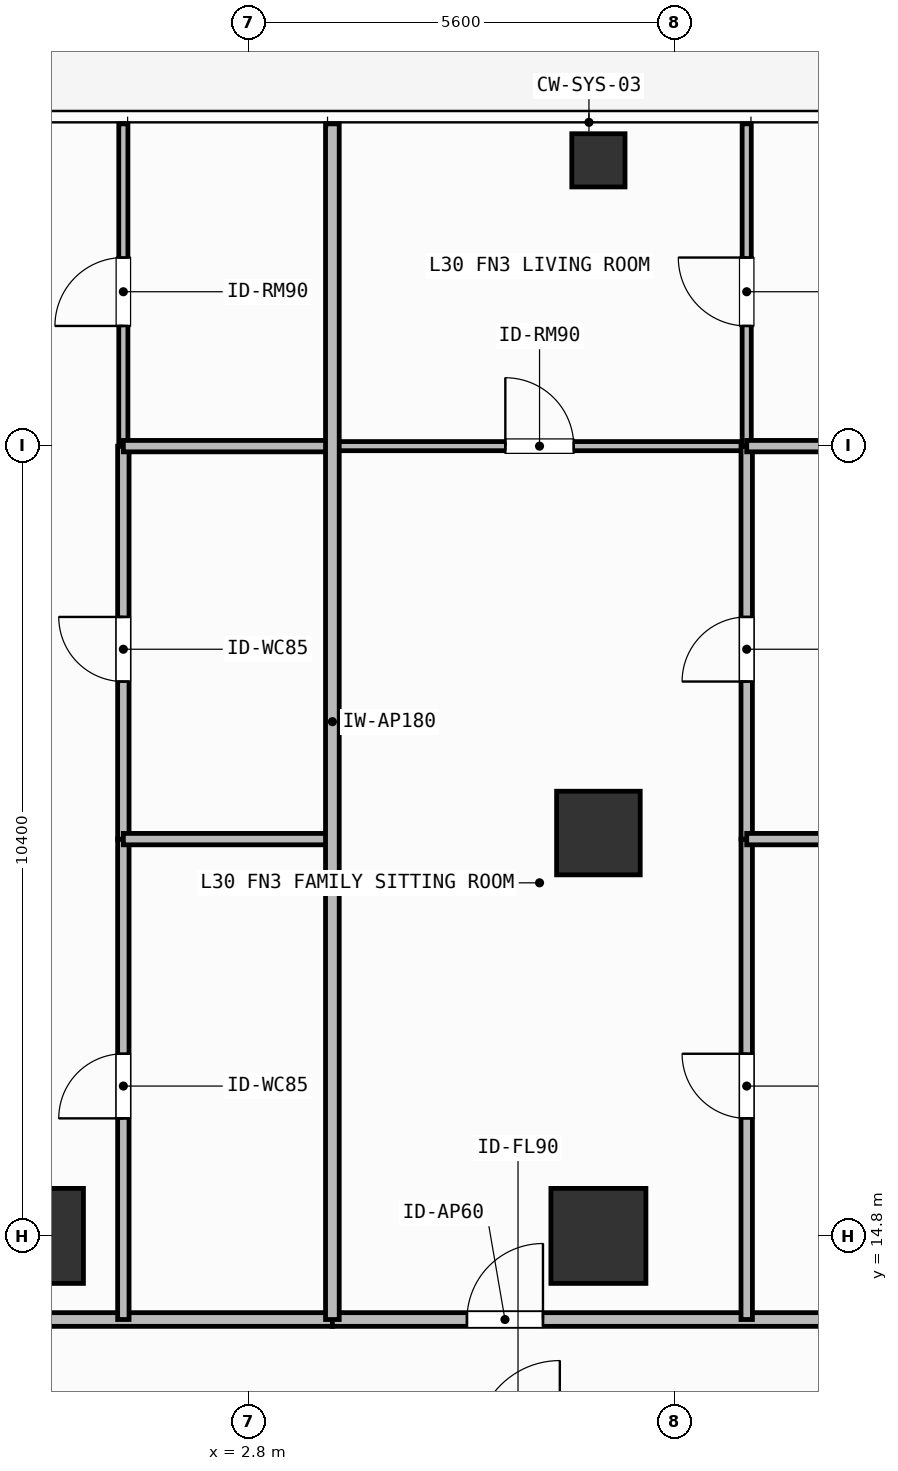
"""IFC4 building model, lengths in metres.
Left out: names, types, materials, properties, quantities, classifications, styles, units other than length and angle.
Written with IfcOpenShell. Run it as: python <this file> out.ifc"""

import sys

from ifc_helpers import new_model, si_unit, direction, frame, frame_2d, origin, origin_2d, place, context, subcontext, project, spatial, rectangle, hollow_rectangle, extrude, element, fill, save


model = new_model("IFC4")
c1 = context("Model", 3, precision=1e-05, world=origin(), true_north=direction((0.0, 1.0)))
c2 = subcontext(c1, "Body", "Model", "MODEL_VIEW")
j1 = project(units=[si_unit("LENGTHUNIT", "METRE"), si_unit("PLANEANGLEUNIT", "RADIAN")], contexts=[c1])
p1 = place(None, origin())
s1 = spatial("IfcSite", under=j1, at=p1, CompositionType="ELEMENT")
p2 = place(p1, origin())
s2 = spatial("IfcBuilding", under=s1, at=p2, CompositionType="ELEMENT")
p3 = place(p2, frame((0.0, 0.0, 121.2)))
s3 = spatial("IfcBuildingStorey", under=s2, at=p3, CompositionType="ELEMENT", Elevation=121.2)
for number, where, z_axis, x_axis in (
    (1, (0.0, 14.8, 0.0), (0.0, 0.0, 1.0), (1.0, 0.0, 0.0)),
    (2, (7.4, 14.8, 0.0), (0.0, 0.0, 1.0), (1.0, 0.0, 0.0)),
):
    element("IfcColumn", number, at=place(p3, frame(where, z_axis=z_axis, x_axis=x_axis)), inside=s3, PredefinedType="COLUMN", context=c2, shape_type="SweptSolid", body=[
        extrude(rectangle(XDim=1.25, YDim=1.25, at=origin_2d()), origin(), (0.0, 0.0, 1.0), 3.9),
    ])
p4 = place(p3, frame((7.4, 20.1, 0.0), z_axis=(0.0, 0.0, 1.0), x_axis=(1.0, 0.0, 0.0)))
e3 = element("IfcColumn", 3, at=p4, inside=s3, PredefinedType="COLUMN", context=c2, shape_type="SweptSolid", body=[
    extrude(rectangle(XDim=1.1, YDim=1.1, at=origin_2d()), origin(), (0.0, 0.0, 1.0), 3.9),
])
p5 = place(p3, frame((7.4, 28.95, 0.0), z_axis=(0.0, 0.0, 1.0), x_axis=(1.0, 0.0, 0.0)))
e4 = element("IfcColumn", 4, at=p5, inside=s3, PredefinedType="COLUMN", context=c2, shape_type="SweptSolid", body=[
    extrude(hollow_rectangle(XDim=0.7, YDim=0.7, WallThickness=0.032, at=origin_2d()), origin(), (0.0, 0.0, 1.0), 3.9),
])
p6 = place(p3, frame((-3.379, 13.7, 0.0), z_axis=(0.0, 0.0, 1.0), x_axis=(1.0, 0.0, 0.0)))
e5 = element("IfcWall", 5, at=p6, inside=s3, PredefinedType="PARTITIONING", context=c2, shape_type="SweptSolid", body=[
    extrude(rectangle(XDim=7.279, YDim=0.18, at=frame_2d((3.639, 0.0))), origin(), (0.0, 0.0, 1.0), 3.68),
])
p7 = place(p6, frame((1.562, 0.0, 0.0)))
e6 = element("IfcOpeningElement", 6, at=p7, cuts=e5, PredefinedType="OPENING", context=c2, shape_type="SweptSolid", body=[
    extrude(rectangle(XDim=1.0, YDim=2.2, at=frame_2d((0.5, 1.1))), frame((0.0, 0.1, 0.0), z_axis=(0.0, -1.0, 0.0), x_axis=(1.0, 0.0, 0.0)), (0.0, 0.0, 1.0), 0.2),
])
p8 = place(p3, frame((1.15, 13.7, 0.0), z_axis=(0.0, 0.0, 1.0), x_axis=(0.0, 1.0, 0.0)))
e7 = element("IfcWall", 7, at=p8, inside=s3, PredefinedType="PARTITIONING", context=c2, shape_type="SweptSolid", body=[
    extrude(rectangle(XDim=6.32, YDim=0.15, at=frame_2d((3.16, 0.0))), origin(), (0.0, 0.0, 1.0), 3.68),
])
p9 = place(p8, frame((2.646, 0.0, 0.0)))
e8 = element("IfcOpeningElement", 8, at=p9, cuts=e7, PredefinedType="OPENING", context=c2, shape_type="SweptSolid", body=[
    extrude(rectangle(XDim=0.85, YDim=2.1, at=frame_2d((0.425, 1.05))), frame((0.0, 0.085, 0.0), z_axis=(0.0, -1.0, 0.0), x_axis=(1.0, 0.0, 0.0)), (0.0, 0.0, 1.0), 0.17),
])
p10 = place(p3, frame((1.15, 20.02, 0.0), z_axis=(0.0, 0.0, 1.0), x_axis=(0.0, 1.0, 0.0)))
e9 = element("IfcWall", 9, at=p10, inside=s3, PredefinedType="PARTITIONING", context=c2, shape_type="SweptSolid", body=[
    extrude(rectangle(XDim=5.17, YDim=0.15, at=frame_2d((2.585, 0.0))), origin(), (0.0, 0.0, 1.0), 3.68),
])
p11 = place(p10, frame((2.073, 0.0, 0.0)))
e10 = element("IfcOpeningElement", 10, at=p11, cuts=e9, PredefinedType="OPENING", context=c2, shape_type="SweptSolid", body=[
    extrude(rectangle(XDim=0.85, YDim=2.1, at=frame_2d((0.425, 1.05))), frame((0.0, 0.085, 0.0), z_axis=(0.0, -1.0, 0.0), x_axis=(1.0, 0.0, 0.0)), (0.0, 0.0, 1.0), 0.17),
])
p12 = place(p3, frame((1.15, 25.19, 0.0), z_axis=(0.0, 0.0, 1.0), x_axis=(0.0, 1.0, 0.0)))
e11 = element("IfcWall", 11, at=p12, inside=s3, PredefinedType="PARTITIONING", context=c2, shape_type="SweptSolid", body=[
    extrude(rectangle(XDim=4.24, YDim=0.12, at=frame_2d((2.12, 0.0))), origin(), (0.0, 0.0, 1.0), 3.68),
])
p13 = place(p12, frame((1.581, 0.0, 0.0)))
e12 = element("IfcOpeningElement", 12, at=p13, cuts=e11, PredefinedType="OPENING", context=c2, shape_type="SweptSolid", body=[
    extrude(rectangle(XDim=0.9, YDim=2.1, at=frame_2d((0.45, 1.05))), frame((0.0, 0.07, 0.0), z_axis=(0.0, -1.0, 0.0), x_axis=(1.0, 0.0, 0.0)), (0.0, 0.0, 1.0), 0.14),
])
p14 = place(p3, frame((3.9, 13.7, 0.0), z_axis=(0.0, 0.0, 1.0), x_axis=(1.0, 0.0, 0.0)))
e13 = element("IfcWall", 13, at=p14, inside=s3, PredefinedType="PARTITIONING", context=c2, shape_type="SweptSolid", body=[
    extrude(rectangle(XDim=8.836, YDim=0.18, at=frame_2d((4.418, 0.0))), origin(), (0.0, 0.0, 1.0), 3.68),
])
p15 = place(p14, frame((1.771, 0.0, 0.0)))
e14 = element("IfcOpeningElement", 14, at=p15, cuts=e13, PredefinedType="OPENING", context=c2, shape_type="SweptSolid", body=[
    extrude(rectangle(XDim=1.0, YDim=2.2, at=frame_2d((0.5, 1.1))), frame((0.0, 0.1, 0.0), z_axis=(0.0, -1.0, 0.0), x_axis=(1.0, 0.0, 0.0)), (0.0, 0.0, 1.0), 0.2),
])
p16 = place(p3, frame((3.9, 25.19, 0.0), z_axis=(0.0, 0.0, 1.0), x_axis=(1.0, 0.0, 0.0)))
e15 = element("IfcWall", 15, at=p16, inside=s3, PredefinedType="PARTITIONING", context=c2, shape_type="SweptSolid", body=[
    extrude(rectangle(XDim=5.451, YDim=0.12, at=frame_2d((2.726, 0.0))), origin(), (0.0, 0.0, 1.0), 3.68),
])
p17 = place(p16, frame((2.275, 0.0, 0.0)))
e16 = element("IfcOpeningElement", 16, at=p17, cuts=e15, PredefinedType="OPENING", context=c2, shape_type="SweptSolid", body=[
    extrude(rectangle(XDim=0.9, YDim=2.1, at=frame_2d((0.45, 1.05))), frame((0.0, 0.07, 0.0), z_axis=(0.0, -1.0, 0.0), x_axis=(1.0, 0.0, 0.0)), (0.0, 0.0, 1.0), 0.14),
])
p18 = place(p3, frame((9.351, 13.7, 0.0), z_axis=(0.0, 0.0, 1.0), x_axis=(0.0, 1.0, 0.0)))
e17 = element("IfcWall", 17, at=p18, inside=s3, PredefinedType="PARTITIONING", context=c2, shape_type="SweptSolid", body=[
    extrude(rectangle(XDim=6.32, YDim=0.15, at=frame_2d((3.16, 0.0))), origin(), (0.0, 0.0, 1.0), 3.68),
])
p19 = place(p18, frame((2.646, 0.0, 0.0)))
e18 = element("IfcOpeningElement", 18, at=p19, cuts=e17, PredefinedType="OPENING", context=c2, shape_type="SweptSolid", body=[
    extrude(rectangle(XDim=0.85, YDim=2.1, at=frame_2d((0.425, 1.05))), frame((0.0, 0.085, 0.0), z_axis=(0.0, -1.0, 0.0), x_axis=(1.0, 0.0, 0.0)), (0.0, 0.0, 1.0), 0.17),
])
p20 = place(p3, frame((9.351, 20.02, 0.0), z_axis=(0.0, 0.0, 1.0), x_axis=(0.0, 1.0, 0.0)))
e19 = element("IfcWall", 19, at=p20, inside=s3, PredefinedType="PARTITIONING", context=c2, shape_type="SweptSolid", body=[
    extrude(rectangle(XDim=5.17, YDim=0.15, at=frame_2d((2.585, 0.0))), origin(), (0.0, 0.0, 1.0), 3.68),
])
p21 = place(p20, frame((2.073, 0.0, 0.0)))
e20 = element("IfcOpeningElement", 20, at=p21, cuts=e19, PredefinedType="OPENING", context=c2, shape_type="SweptSolid", body=[
    extrude(rectangle(XDim=0.85, YDim=2.1, at=frame_2d((0.425, 1.05))), frame((0.0, 0.085, 0.0), z_axis=(0.0, -1.0, 0.0), x_axis=(1.0, 0.0, 0.0)), (0.0, 0.0, 1.0), 0.17),
])
p22 = place(p3, frame((9.351, 25.19, 0.0), z_axis=(0.0, 0.0, 1.0), x_axis=(0.0, 1.0, 0.0)))
e21 = element("IfcWall", 21, at=p22, inside=s3, PredefinedType="PARTITIONING", context=c2, shape_type="SweptSolid", body=[
    extrude(rectangle(XDim=4.24, YDim=0.12, at=frame_2d((2.12, 0.0))), origin(), (0.0, 0.0, 1.0), 3.68),
])
p23 = place(p22, frame((1.581, 0.0, 0.0)))
e22 = element("IfcOpeningElement", 22, at=p23, cuts=e21, PredefinedType="OPENING", context=c2, shape_type="SweptSolid", body=[
    extrude(rectangle(XDim=0.9, YDim=2.1, at=frame_2d((0.45, 1.05))), frame((0.0, 0.07, 0.0), z_axis=(0.0, -1.0, 0.0), x_axis=(1.0, 0.0, 0.0)), (0.0, 0.0, 1.0), 0.14),
])
p24 = place(p3, frame((1.15, 20.02, 0.0), z_axis=(0.0, 0.0, 1.0), x_axis=(1.0, 0.0, 0.0)))
e23 = element("IfcWall", 23, at=p24, inside=s3, PredefinedType="PARTITIONING", context=c2, shape_type="SweptSolid", body=[
    extrude(rectangle(XDim=2.75, YDim=0.15, at=frame_2d((1.375, 0.0))), origin(), (0.0, 0.0, 1.0), 3.082),
])
p25 = place(p3, frame((1.15, 25.19, 0.0), z_axis=(0.0, 0.0, 1.0), x_axis=(1.0, 0.0, 0.0)))
e24 = element("IfcWall", 24, at=p25, inside=s3, PredefinedType="PARTITIONING", context=c2, shape_type="SweptSolid", body=[
    extrude(rectangle(XDim=2.75, YDim=0.15, at=frame_2d((1.375, 0.0))), origin(), (0.0, 0.0, 1.0), 3.68),
])
p26 = place(p3, frame((9.351, 20.02, 0.0), z_axis=(0.0, 0.0, 1.0), x_axis=(1.0, 0.0, 0.0)))
e25 = element("IfcWall", 25, at=p26, inside=s3, PredefinedType="PARTITIONING", context=c2, shape_type="SweptSolid", body=[
    extrude(rectangle(XDim=3.385, YDim=0.15, at=frame_2d((1.692, 0.0))), origin(), (0.0, 0.0, 1.0), 3.082),
])
p27 = place(p3, frame((9.351, 25.19, 0.0), z_axis=(0.0, 0.0, 1.0), x_axis=(1.0, 0.0, 0.0)))
e26 = element("IfcWall", 26, at=p27, inside=s3, PredefinedType="PARTITIONING", context=c2, shape_type="SweptSolid", body=[
    extrude(rectangle(XDim=3.385, YDim=0.15, at=frame_2d((1.692, 0.0))), origin(), (0.0, 0.0, 1.0), 3.68),
])
p28 = place(p3, frame((3.9, 13.7, 0.0), z_axis=(0.0, 0.0, 1.0), x_axis=(0.0, 1.0, 0.0)))
e27 = element("IfcWall", 27, at=p28, inside=s3, PredefinedType="PARTITIONING", context=c2, shape_type="SweptSolid", body=[
    extrude(rectangle(XDim=15.73, YDim=0.18, at=frame_2d((7.865, 0.0))), origin(), (0.0, 0.0, 1.0), 3.68),
])
p29 = place(p9, origin())
e28 = element("IfcDoor", 28, at=p29, inside=s3, OperationType="SINGLE_SWING_LEFT", PredefinedType="DOOR", context=c2, shape_type="SweptSolid", body=[
    extrude(rectangle(XDim=0.85, YDim=2.1, at=frame_2d((0.425, 1.05))), frame((0.0, 0.025, 0.0), z_axis=(0.0, -1.0, 0.0), x_axis=(1.0, 0.0, 0.0)), (0.0, 0.0, 1.0), 0.05),
])
fill(e8, e28)
p30 = place(p11, origin())
e29 = element("IfcDoor", 29, at=p30, inside=s3, OperationType="SINGLE_SWING_RIGHT", PredefinedType="DOOR", context=c2, shape_type="SweptSolid", body=[
    extrude(rectangle(XDim=0.85, YDim=2.1, at=frame_2d((0.425, 1.05))), frame((0.0, 0.025, 0.0), z_axis=(0.0, -1.0, 0.0), x_axis=(1.0, 0.0, 0.0)), (0.0, 0.0, 1.0), 0.05),
])
fill(e10, e29)
p31 = place(p13, origin())
e30 = element("IfcDoor", 30, at=p31, inside=s3, OperationType="SINGLE_SWING_LEFT", PredefinedType="DOOR", context=c2, shape_type="SweptSolid", body=[
    extrude(rectangle(XDim=0.9, YDim=2.1, at=frame_2d((0.45, 1.05))), frame((0.0, 0.025, 0.0), z_axis=(0.0, -1.0, 0.0), x_axis=(1.0, 0.0, 0.0)), (0.0, 0.0, 1.0), 0.05),
])
fill(e12, e30)
p32 = place(p15, origin())
e31 = element("IfcDoor", 31, at=p32, inside=s3, OperationType="SINGLE_SWING_RIGHT", PredefinedType="DOOR", context=c2, shape_type="SweptSolid", body=[
    extrude(rectangle(XDim=1.0, YDim=2.2, at=frame_2d((0.5, 1.1))), frame((0.0, 0.025, 0.0), z_axis=(0.0, -1.0, 0.0), x_axis=(1.0, 0.0, 0.0)), (0.0, 0.0, 1.0), 0.05),
])
fill(e14, e31)
p33 = place(p17, origin())
e32 = element("IfcDoor", 32, at=p33, inside=s3, OperationType="SINGLE_SWING_LEFT", PredefinedType="DOOR", context=c2, shape_type="SweptSolid", body=[
    extrude(rectangle(XDim=0.9, YDim=2.1, at=frame_2d((0.45, 1.05))), frame((0.0, 0.025, 0.0), z_axis=(0.0, -1.0, 0.0), x_axis=(1.0, 0.0, 0.0)), (0.0, 0.0, 1.0), 0.05),
])
fill(e16, e32)
p34 = place(p19, origin())
e33 = element("IfcDoor", 33, at=p34, inside=s3, OperationType="SINGLE_SWING_RIGHT", PredefinedType="DOOR", context=c2, shape_type="SweptSolid", body=[
    extrude(rectangle(XDim=0.85, YDim=2.1, at=frame_2d((0.425, 1.05))), frame((0.0, 0.025, 0.0), z_axis=(0.0, -1.0, 0.0), x_axis=(1.0, 0.0, 0.0)), (0.0, 0.0, 1.0), 0.05),
])
fill(e18, e33)
p35 = place(p21, origin())
e34 = element("IfcDoor", 34, at=p35, inside=s3, OperationType="SINGLE_SWING_LEFT", PredefinedType="DOOR", context=c2, shape_type="SweptSolid", body=[
    extrude(rectangle(XDim=0.85, YDim=2.1, at=frame_2d((0.425, 1.05))), frame((0.0, 0.025, 0.0), z_axis=(0.0, -1.0, 0.0), x_axis=(1.0, 0.0, 0.0)), (0.0, 0.0, 1.0), 0.05),
])
fill(e20, e34)
p36 = place(p23, origin())
e35 = element("IfcDoor", 35, at=p36, inside=s3, OperationType="SINGLE_SWING_RIGHT", PredefinedType="DOOR", context=c2, shape_type="SweptSolid", body=[
    extrude(rectangle(XDim=0.9, YDim=2.1, at=frame_2d((0.45, 1.05))), frame((0.0, 0.025, 0.0), z_axis=(0.0, -1.0, 0.0), x_axis=(1.0, 0.0, 0.0)), (0.0, 0.0, 1.0), 0.05),
])
fill(e22, e35)
save(model, sys.argv[1])
